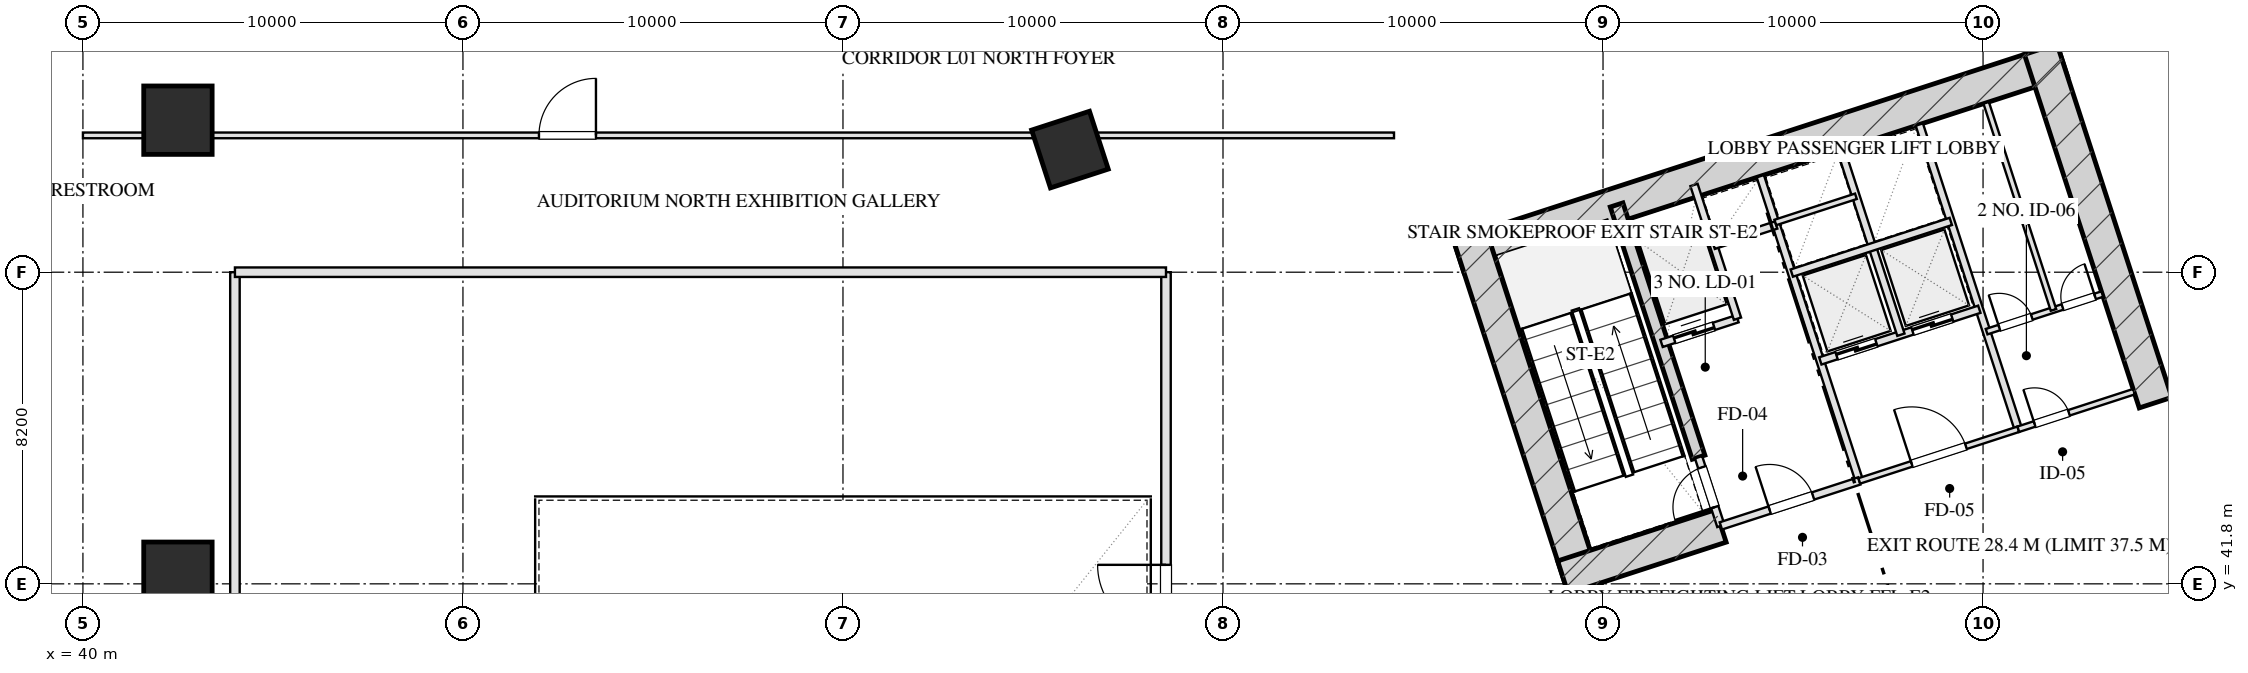
"""IFC4 building model, lengths in metres.
Left out: names, types, materials, properties, quantities, classifications, styles, units other than length and angle.
Written with IfcOpenShell. Run it as: python <this file> out.ifc"""

import sys

from ifc_helpers import new_model, si_unit, direction, frame, frame_2d, origin, origin_2d, place, context, subcontext, project, spatial, rectangle, hollow_rectangle, extrude, element, fill, save


model = new_model("IFC4")
c1 = context("Model", 3, precision=1e-05, world=origin(), true_north=direction((0.0, 1.0)))
c2 = subcontext(c1, "Body", "Model", "MODEL_VIEW")
j1 = project(units=[si_unit("LENGTHUNIT", "METRE"), si_unit("PLANEANGLEUNIT", "RADIAN")], contexts=[c1])
p1 = place(None, origin())
s1 = spatial("IfcSite", under=j1, at=p1, CompositionType="ELEMENT")
p2 = place(p1, origin())
s2 = spatial("IfcBuilding", under=s1, at=p2, CompositionType="ELEMENT")
p3 = place(p2, frame((0.0, 0.0, 6.0)))
s3 = spatial("IfcBuildingStorey", under=s2, at=p3, CompositionType="ELEMENT", Elevation=6.0)
p4 = place(p3, frame((76.201, 50.419, 0.0), z_axis=(0.0, 0.0, 1.0), x_axis=(0.951056412142, 0.309017314926, 0.0)))
e1 = element("IfcWall", 1, at=p4, inside=s3, PredefinedType="SHEAR", context=c2, shape_type="SweptSolid", body=[
    extrude(rectangle(XDim=16.7, YDim=0.9, at=frame_2d((8.35, 0.0))), origin(), (0.0, 0.0, 1.0), 5.5),
])
for number, where, z_axis, x_axis in (
    (2, (79.512, 41.685, 0.0), (0.0, 0.0, 1.0), (-0.309, 0.951, 0.0)),
    (3, (94.539, 46.568, 0.0), (0.0, 0.0, 1.0), (-0.309, 0.951, 0.0)),
):
    element("IfcWall", number, at=place(p3, frame(where, z_axis=z_axis, x_axis=x_axis)), inside=s3, PredefinedType="SHEAR", context=c2, shape_type="SweptSolid", body=[
        extrude(rectangle(XDim=9.78, YDim=0.9, at=frame_2d((4.89, 0.0))), origin(), (0.0, 0.0, 1.0), 5.5),
    ])
p5 = place(p3, frame((82.514, 45.131, 0.0), z_axis=(0.0, 0.0, 1.0), x_axis=(-0.308988790936, 0.951065679686, 0.0)))
e4 = element("IfcWall", 4, at=p5, inside=s3, PredefinedType="SHEAR", context=c2, shape_type="SweptSolid", body=[
    extrude(rectangle(XDim=6.98, YDim=0.35, at=frame_2d((3.49, 0.0))), origin(), (0.0, 0.0, 1.0), 5.5),
])
p6 = place(p3, frame((78.945, 41.974, 0.0), z_axis=(0.0, 0.0, 1.0), x_axis=(0.951058289404, 0.309011537255, 0.0)))
e5 = element("IfcWall", 5, at=p6, inside=s3, PredefinedType="SHEAR", context=c2, shape_type="SweptSolid", body=[
    extrude(rectangle(XDim=4.37, YDim=0.9, at=frame_2d((2.185, 0.0))), origin(), (0.0, 0.0, 1.0), 5.5),
])
for number, where, z_axis, x_axis in (
    (6, (42.5, 42.0, 0.0), (0.0, 0.0, 1.0), (1.0, 0.0, 0.0)),
    (7, (42.5, 54.0, 0.0), (0.0, 0.0, 1.0), (1.0, 0.0, 0.0)),
):
    element("IfcColumn", number, at=place(p3, frame(where, z_axis=z_axis, x_axis=x_axis)), inside=s3, PredefinedType="COLUMN", context=c2, shape_type="SweptSolid", body=[
        extrude(hollow_rectangle(XDim=1.8, YDim=1.8, WallThickness=0.06, at=origin_2d()), origin(), (0.0, 0.0, 1.0), 5.501),
    ])
p7 = place(p3, frame((65.973, 53.226, 0.0), z_axis=(0.0, 0.0, 1.0), x_axis=(0.951056516295, 0.309016994375, 0.0)))
e8 = element("IfcColumn", 8, at=p7, inside=s3, PredefinedType="COLUMN", context=c2, shape_type="SweptSolid", body=[
    extrude(hollow_rectangle(XDim=1.6, YDim=1.6, WallThickness=0.055, at=origin_2d()), origin(), (0.0, 0.0, 1.0), 5.501),
])
p8 = place(p3, frame((83.101, 43.324, 0.0), z_axis=(0.0, 0.0, 1.0), x_axis=(-0.309048298632, 0.951046344356, 0.0)))
e9 = element("IfcWall", 9, at=p8, inside=s3, PredefinedType="PARTITIONING", context=c2, shape_type="SweptSolid", body=[
    extrude(rectangle(XDim=1.9, YDim=0.2, at=frame_2d((0.95, 0.0))), origin(), (0.0, 0.0, 1.0), 5.185),
])
p9 = place(p8, frame((0.52, 0.0, 0.0)))
e10 = element("IfcOpeningElement", 10, at=p9, cuts=e9, PredefinedType="OPENING", context=c2, shape_type="SweptSolid", body=[
    extrude(rectangle(XDim=1.1, YDim=2.05, at=frame_2d((0.55, 1.025))), frame((0.0, 0.11, 0.0), z_axis=(0.0, -1.0, 0.0), x_axis=(1.0, 0.0, 0.0)), (0.0, 0.0, 1.0), 0.22),
])
p10 = place(p3, frame((86.743, 44.508, 0.0), z_axis=(0.0, 0.0, 1.0), x_axis=(-0.309016001439, 0.951056838919, 0.0)))
e11 = element("IfcWall", 11, at=p10, inside=s3, PredefinedType="PARTITIONING", context=c2, shape_type="SweptSolid", body=[
    extrude(rectangle(XDim=8.43, YDim=0.2, at=frame_2d((4.215, 0.0))), origin(), (0.0, 0.0, 1.0), 5.185),
])
p11 = place(p3, frame((83.101, 43.324, 0.0), z_axis=(0.0, 0.0, 1.0), x_axis=(0.951052804469, 0.309028417967, 0.0)))
e12 = element("IfcWall", 12, at=p11, inside=s3, PredefinedType="PARTITIONING", context=c2, shape_type="SweptSolid", body=[
    extrude(rectangle(XDim=3.83, YDim=0.2, at=frame_2d((1.915, 0.0))), origin(), (0.0, 0.0, 1.0), 5.185),
])
p12 = place(p11, frame((1.35, 0.0, 0.0)))
e13 = element("IfcOpeningElement", 13, at=p12, cuts=e12, PredefinedType="OPENING", context=c2, shape_type="SweptSolid", body=[
    extrude(rectangle(XDim=1.2, YDim=2.05, at=frame_2d((0.6, 1.025))), frame((0.0, 0.11, 0.0), z_axis=(0.0, -1.0, 0.0), x_axis=(1.0, 0.0, 0.0)), (0.0, 0.0, 1.0), 0.22),
])
p13 = place(p3, frame((81.54, 48.127, 0.0), z_axis=(0.0, 0.0, 1.0), x_axis=(0.951062257173, 0.308999325213, 0.0)))
e14 = element("IfcWall", 14, at=p13, inside=s3, PredefinedType="PARTITIONING", context=c2, shape_type="SweptSolid", body=[
    extrude(rectangle(XDim=2.1, YDim=0.2, at=frame_2d((1.05, 0.0))), origin(), (0.0, 0.0, 1.0), 5.185),
])
p14 = place(p13, frame((0.35, 0.0, 0.0)))
e15 = element("IfcOpeningElement", 15, at=p14, cuts=e14, PredefinedType="OPENING", context=c2, shape_type="SweptSolid", body=[
    extrude(rectangle(XDim=1.1, YDim=2.05, at=frame_2d((0.55, 1.025))), frame((0.0, 0.11, 0.0), z_axis=(0.0, -1.0, 0.0), x_axis=(1.0, 0.0, 0.0)), (0.0, 0.0, 1.0), 0.22),
])
p15 = place(p3, frame((83.538, 48.776, 0.0), z_axis=(0.0, 0.0, 1.0), x_axis=(-0.3089935693, 0.951064127245, 0.0)))
e16 = element("IfcWall", 16, at=p15, inside=s3, PredefinedType="PARTITIONING", context=c2, shape_type="SweptSolid", body=[
    extrude(rectangle(XDim=3.7, YDim=0.2, at=frame_2d((1.85, 0.0))), origin(), (0.0, 0.0, 1.0), 5.185),
])
p16 = place(p3, frame((82.91, 50.707, 0.0), z_axis=(0.0, 0.0, 1.0), x_axis=(0.951041328149, 0.309063734775, 0.0)))
e17 = element("IfcWall", 17, at=p16, inside=s3, PredefinedType="PARTITIONING", context=c2, shape_type="SweptSolid", body=[
    extrude(rectangle(XDim=1.73, YDim=0.2, at=frame_2d((0.865, 0.0))), origin(), (0.0, 0.0, 1.0), 5.185),
])
p17 = place(p3, frame((90.928, 45.868, 0.0), z_axis=(0.0, 0.0, 1.0), x_axis=(-0.309042196757, 0.951048327176, 0.0)))
e18 = element("IfcWall", 18, at=p17, inside=s3, PredefinedType="PARTITIONING", context=c2, shape_type="SweptSolid", body=[
    extrude(rectangle(XDim=8.43, YDim=0.2, at=frame_2d((4.215, 0.0))), origin(), (0.0, 0.0, 1.0), 5.185),
])
p18 = place(p3, frame((86.743, 44.508, 0.0), z_axis=(0.0, 0.0, 1.0), x_axis=(0.951063829732, 0.308994485023, 0.0)))
e19 = element("IfcWall", 19, at=p18, inside=s3, PredefinedType="PARTITIONING", context=c2, shape_type="SweptSolid", body=[
    extrude(rectangle(XDim=4.4, YDim=0.15, at=frame_2d((2.2, 0.0))), origin(), (0.0, 0.0, 1.0), 5.185),
])
p19 = place(p18, frame((1.45, 0.0, 0.0)))
e20 = element("IfcOpeningElement", 20, at=p19, cuts=e19, PredefinedType="OPENING", context=c2, shape_type="SweptSolid", body=[
    extrude(rectangle(XDim=1.5, YDim=2.05, at=frame_2d((0.75, 1.025))), frame((0.0, 0.085, 0.0), z_axis=(0.0, -1.0, 0.0), x_axis=(1.0, 0.0, 0.0)), (0.0, 0.0, 1.0), 0.17),
])
p20 = place(p3, frame((85.718, 47.666, 0.0), z_axis=(0.0, 0.0, 1.0), x_axis=(0.951058531764, 0.30901079133, 0.0)))
e21 = element("IfcWall", 21, at=p20, inside=s3, PredefinedType="PARTITIONING", context=c2, shape_type="SweptSolid", body=[
    extrude(rectangle(XDim=4.4, YDim=0.2, at=frame_2d((2.2, 0.0))), origin(), (0.0, 0.0, 1.0), 5.185),
])
p21 = place(p20, frame((0.45, 0.0, 0.0)))
e22 = element("IfcOpeningElement", 22, at=p21, cuts=e21, PredefinedType="OPENING", context=c2, shape_type="SweptSolid", body=[
    extrude(rectangle(XDim=1.1, YDim=2.05, at=frame_2d((0.55, 1.025))), frame((0.0, 0.11, 0.0), z_axis=(0.0, -1.0, 0.0), x_axis=(1.0, 0.0, 0.0)), (0.0, 0.0, 1.0), 0.22),
])
p22 = place(p20, frame((2.55, 0.0, 0.0)))
e23 = element("IfcOpeningElement", 23, at=p22, cuts=e21, PredefinedType="OPENING", context=c2, shape_type="SweptSolid", body=[
    extrude(rectangle(XDim=1.1, YDim=2.05, at=frame_2d((0.55, 1.025))), frame((0.0, 0.11, 0.0), z_axis=(0.0, -1.0, 0.0), x_axis=(1.0, 0.0, 0.0)), (0.0, 0.0, 1.0), 0.22),
])
p23 = place(p3, frame((87.838, 48.354, 0.0), z_axis=(0.0, 0.0, 1.0), x_axis=(-0.3090093719, 0.951058992953, 0.0)))
e24 = element("IfcWall", 24, at=p23, inside=s3, PredefinedType="PARTITIONING", context=c2, shape_type="SweptSolid", body=[
    extrude(rectangle(XDim=5.11, YDim=0.2, at=frame_2d((2.555, 0.0))), origin(), (0.0, 0.0, 1.0), 5.185),
])
p24 = place(p3, frame((84.967, 49.977, 0.0), z_axis=(0.0, 0.0, 1.0), x_axis=(0.951063829732, 0.308994485023, 0.0)))
e25 = element("IfcWall", 25, at=p24, inside=s3, PredefinedType="PARTITIONING", context=c2, shape_type="SweptSolid", body=[
    extrude(rectangle(XDim=4.4, YDim=0.2, at=frame_2d((2.2, 0.0))), origin(), (0.0, 0.0, 1.0), 5.185),
])
p25 = place(p3, frame((84.534, 51.308, 0.0), z_axis=(0.0, 0.0, 1.0), x_axis=(0.951075093106, 0.308959814982, 0.0)))
e26 = element("IfcWall", 26, at=p25, inside=s3, PredefinedType="PARTITIONING", context=c2, shape_type="SweptSolid", body=[
    extrude(rectangle(XDim=2.23, YDim=0.15, at=frame_2d((1.115, 0.0))), origin(), (0.0, 0.0, 1.0), 5.185),
])
p26 = place(p3, frame((90.928, 45.868, 0.0), z_axis=(0.0, 0.0, 1.0), x_axis=(0.951059297078, 0.309008435874, 0.0)))
e27 = element("IfcWall", 27, at=p26, inside=s3, PredefinedType="PARTITIONING", context=c2, shape_type="SweptSolid", body=[
    extrude(rectangle(XDim=3.2, YDim=0.15, at=frame_2d((1.6, 0.0))), origin(), (0.0, 0.0, 1.0), 5.185),
])
p27 = place(p26, frame((0.45, 0.0, 0.0)))
e28 = element("IfcOpeningElement", 28, at=p27, cuts=e27, PredefinedType="OPENING", context=c2, shape_type="SweptSolid", body=[
    extrude(rectangle(XDim=0.95, YDim=2.05, at=frame_2d((0.475, 1.025))), frame((0.0, 0.085, 0.0), z_axis=(0.0, -1.0, 0.0), x_axis=(1.0, 0.0, 0.0)), (0.0, 0.0, 1.0), 0.17),
])
p28 = place(p3, frame((90.094, 48.436, 0.0), z_axis=(0.0, 0.0, 1.0), x_axis=(0.951066581729, 0.308986014439, 0.0)))
e29 = element("IfcWall", 29, at=p28, inside=s3, PredefinedType="PARTITIONING", context=c2, shape_type="SweptSolid", body=[
    extrude(rectangle(XDim=3.2, YDim=0.15, at=frame_2d((1.6, 0.0))), origin(), (0.0, 0.0, 1.0), 5.185),
])
p29 = place(p28, frame((0.35, 0.0, 0.0)))
e30 = element("IfcOpeningElement", 30, at=p29, cuts=e29, PredefinedType="OPENING", context=c2, shape_type="SweptSolid", body=[
    extrude(rectangle(XDim=0.9, YDim=2.05, at=frame_2d((0.45, 1.025))), frame((0.0, 0.085, 0.0), z_axis=(0.0, -1.0, 0.0), x_axis=(1.0, 0.0, 0.0)), (0.0, 0.0, 1.0), 0.17),
])
p30 = place(p28, frame((2.1, 0.0, 0.0)))
e31 = element("IfcOpeningElement", 31, at=p30, cuts=e29, PredefinedType="OPENING", context=c2, shape_type="SweptSolid", body=[
    extrude(rectangle(XDim=0.9, YDim=2.05, at=frame_2d((0.45, 1.025))), frame((0.0, 0.085, 0.0), z_axis=(0.0, -1.0, 0.0), x_axis=(1.0, 0.0, 0.0)), (0.0, 0.0, 1.0), 0.17),
])
p31 = place(p3, frame((91.853, 49.007, 0.0), z_axis=(0.0, 0.0, 1.0), x_axis=(-0.309022487551, 0.951054731437, 0.0)))
e32 = element("IfcWall", 32, at=p31, inside=s3, PredefinedType="PARTITIONING", context=c2, shape_type="SweptSolid", body=[
    extrude(rectangle(XDim=5.73, YDim=0.15, at=frame_2d((2.865, 0.0))), origin(), (0.0, 0.0, 1.0), 5.185),
])
p32 = place(p3, frame((44.0, 18.0, 0.0), z_axis=(0.0, 0.0, 1.0), x_axis=(0.0, 1.0, 0.0)))
e33 = element("IfcWall", 33, at=p32, inside=s3, PredefinedType="PARTITIONING", context=c2, shape_type="SweptSolid", body=[
    extrude(rectangle(XDim=32.0, YDim=0.25, at=frame_2d((16.0, 0.0))), origin(), (0.0, 0.0, 1.0), 5.185),
])
p33 = place(p32, frame((9.4, 0.0, 0.0)))
e34 = element("IfcOpeningElement", 34, at=p33, cuts=e33, PredefinedType="OPENING", context=c2, shape_type="SweptSolid", body=[
    extrude(rectangle(XDim=1.8, YDim=2.05, at=frame_2d((0.9, 1.025))), frame((0.0, 0.135, 0.0), z_axis=(0.0, -1.0, 0.0), x_axis=(1.0, 0.0, 0.0)), (0.0, 0.0, 1.0), 0.27),
])
p34 = place(p32, frame((20.6, 0.0, 0.0)))
e35 = element("IfcOpeningElement", 35, at=p34, cuts=e33, PredefinedType="OPENING", context=c2, shape_type="SweptSolid", body=[
    extrude(rectangle(XDim=1.8, YDim=2.05, at=frame_2d((0.9, 1.025))), frame((0.0, 0.135, 0.0), z_axis=(0.0, -1.0, 0.0), x_axis=(1.0, 0.0, 0.0)), (0.0, 0.0, 1.0), 0.27),
])
p35 = place(p3, frame((68.5, 18.0, 0.0), z_axis=(0.0, 0.0, 1.0), x_axis=(0.0, 1.0, 0.0)))
e36 = element("IfcWall", 36, at=p35, inside=s3, PredefinedType="PARTITIONING", context=c2, shape_type="SweptSolid", body=[
    extrude(rectangle(XDim=32.0, YDim=0.25, at=frame_2d((16.0, 0.0))), origin(), (0.0, 0.0, 1.0), 5.185),
])
p36 = place(p35, frame((7.5, 0.0, 0.0)))
e37 = element("IfcOpeningElement", 37, at=p36, cuts=e36, PredefinedType="OPENING", context=c2, shape_type="SweptSolid", body=[
    extrude(rectangle(XDim=1.8, YDim=2.05, at=frame_2d((0.9, 1.025))), frame((0.0, 0.135, 0.0), z_axis=(0.0, -1.0, 0.0), x_axis=(1.0, 0.0, 0.0)), (0.0, 0.0, 1.0), 0.27),
])
p37 = place(p35, frame((22.5, 0.0, 0.0)))
e38 = element("IfcOpeningElement", 38, at=p37, cuts=e36, PredefinedType="OPENING", context=c2, shape_type="SweptSolid", body=[
    extrude(rectangle(XDim=1.8, YDim=2.05, at=frame_2d((0.9, 1.025))), frame((0.0, 0.135, 0.0), z_axis=(0.0, -1.0, 0.0), x_axis=(1.0, 0.0, 0.0)), (0.0, 0.0, 1.0), 0.27),
])
p38 = place(p3, frame((44.0, 50.0, 0.0), z_axis=(0.0, 0.0, 1.0), x_axis=(1.0, 0.0, 0.0)))
e39 = element("IfcWall", 39, at=p38, inside=s3, PredefinedType="PARTITIONING", context=c2, shape_type="SweptSolid", body=[
    extrude(rectangle(XDim=24.5, YDim=0.25, at=frame_2d((12.25, 0.0))), origin(), (0.0, 0.0, 1.0), 5.185),
])
p39 = place(p3, frame((40.0, 53.6, 0.0), z_axis=(0.0, 0.0, 1.0), x_axis=(1.0, 0.0, 0.0)))
e40 = element("IfcWall", 40, at=p39, inside=s3, PredefinedType="PARTITIONING", context=c2, shape_type="SweptSolid", body=[
    extrude(rectangle(XDim=34.5, YDim=0.15, at=frame_2d((17.25, 0.0))), origin(), (0.0, 0.0, 1.0), 5.185),
])
p40 = place(p39, frame((12.0, 0.0, 0.0)))
e41 = element("IfcOpeningElement", 41, at=p40, cuts=e40, PredefinedType="OPENING", context=c2, shape_type="SweptSolid", body=[
    extrude(rectangle(XDim=1.5, YDim=2.05, at=frame_2d((0.75, 1.025))), frame((0.0, 0.085, 0.0), z_axis=(0.0, -1.0, 0.0), x_axis=(1.0, 0.0, 0.0)), (0.0, 0.0, 1.0), 0.17),
])
p41 = place(p9, origin())
e42 = element("IfcDoor", 42, at=p41, inside=s3, OperationType="SINGLE_SWING_LEFT", PredefinedType="DOOR", context=c2, shape_type="SweptSolid", body=[
    extrude(rectangle(XDim=1.1, YDim=2.05, at=frame_2d((0.55, 1.025))), frame((0.0, 0.025, 0.0), z_axis=(0.0, -1.0, 0.0), x_axis=(1.0, 0.0, 0.0)), (0.0, 0.0, 1.0), 0.05),
])
fill(e10, e42)
p42 = place(p12, origin())
e43 = element("IfcDoor", 43, at=p42, inside=s3, OperationType="SINGLE_SWING_LEFT", PredefinedType="DOOR", context=c2, shape_type="SweptSolid", body=[
    extrude(rectangle(XDim=1.2, YDim=2.05, at=frame_2d((0.6, 1.025))), frame((0.0, 0.025, 0.0), z_axis=(0.0, -1.0, 0.0), x_axis=(1.0, 0.0, 0.0)), (0.0, 0.0, 1.0), 0.05),
])
fill(e13, e43)
p43 = place(p14, origin())
e44 = element("IfcDoor", 44, at=p43, inside=s3, OperationType="DOUBLE_DOOR_SLIDING", PredefinedType="DOOR", context=c2, shape_type="SweptSolid", body=[
    extrude(rectangle(XDim=1.1, YDim=2.05, at=frame_2d((0.55, 1.025))), frame((0.0, 0.025, 0.0), z_axis=(0.0, -1.0, 0.0), x_axis=(1.0, 0.0, 0.0)), (0.0, 0.0, 1.0), 0.05),
])
fill(e15, e44)
p44 = place(p19, origin())
e45 = element("IfcDoor", 45, at=p44, inside=s3, OperationType="SINGLE_SWING_LEFT", PredefinedType="DOOR", context=c2, shape_type="SweptSolid", body=[
    extrude(rectangle(XDim=1.5, YDim=2.05, at=frame_2d((0.75, 1.025))), frame((0.0, 0.025, 0.0), z_axis=(0.0, -1.0, 0.0), x_axis=(1.0, 0.0, 0.0)), (0.0, 0.0, 1.0), 0.05),
])
fill(e20, e45)
p45 = place(p21, origin())
e46 = element("IfcDoor", 46, at=p45, inside=s3, OperationType="DOUBLE_DOOR_SLIDING", PredefinedType="DOOR", context=c2, shape_type="SweptSolid", body=[
    extrude(rectangle(XDim=1.1, YDim=2.05, at=frame_2d((0.55, 1.025))), frame((0.0, 0.025, 0.0), z_axis=(0.0, -1.0, 0.0), x_axis=(1.0, 0.0, 0.0)), (0.0, 0.0, 1.0), 0.05),
])
fill(e22, e46)
p46 = place(p22, origin())
e47 = element("IfcDoor", 47, at=p46, inside=s3, OperationType="DOUBLE_DOOR_SLIDING", PredefinedType="DOOR", context=c2, shape_type="SweptSolid", body=[
    extrude(rectangle(XDim=1.1, YDim=2.05, at=frame_2d((0.55, 1.025))), frame((0.0, 0.025, 0.0), z_axis=(0.0, -1.0, 0.0), x_axis=(1.0, 0.0, 0.0)), (0.0, 0.0, 1.0), 0.05),
])
fill(e23, e47)
p47 = place(p27, origin())
e48 = element("IfcDoor", 48, at=p47, inside=s3, OperationType="SINGLE_SWING_LEFT", PredefinedType="DOOR", context=c2, shape_type="SweptSolid", body=[
    extrude(rectangle(XDim=0.95, YDim=2.05, at=frame_2d((0.475, 1.025))), frame((0.0, 0.025, 0.0), z_axis=(0.0, -1.0, 0.0), x_axis=(1.0, 0.0, 0.0)), (0.0, 0.0, 1.0), 0.05),
])
fill(e28, e48)
p48 = place(p29, origin())
e49 = element("IfcDoor", 49, at=p48, inside=s3, OperationType="SINGLE_SWING_LEFT", PredefinedType="DOOR", context=c2, shape_type="SweptSolid", body=[
    extrude(rectangle(XDim=0.9, YDim=2.05, at=frame_2d((0.45, 1.025))), frame((0.0, 0.025, 0.0), z_axis=(0.0, -1.0, 0.0), x_axis=(1.0, 0.0, 0.0)), (0.0, 0.0, 1.0), 0.05),
])
fill(e30, e49)
p49 = place(p30, origin())
e50 = element("IfcDoor", 50, at=p49, inside=s3, OperationType="SINGLE_SWING_RIGHT", PredefinedType="DOOR", context=c2, shape_type="SweptSolid", body=[
    extrude(rectangle(XDim=0.9, YDim=2.05, at=frame_2d((0.45, 1.025))), frame((0.0, 0.025, 0.0), z_axis=(0.0, -1.0, 0.0), x_axis=(1.0, 0.0, 0.0)), (0.0, 0.0, 1.0), 0.05),
])
fill(e31, e50)
p50 = place(p37, origin())
e51 = element("IfcDoor", 51, at=p50, inside=s3, OperationType="SINGLE_SWING_RIGHT", PredefinedType="DOOR", context=c2, shape_type="SweptSolid", body=[
    extrude(rectangle(XDim=1.8, YDim=2.05, at=frame_2d((0.9, 1.025))), frame((0.0, 0.025, 0.0), z_axis=(0.0, -1.0, 0.0), x_axis=(1.0, 0.0, 0.0)), (0.0, 0.0, 1.0), 0.05),
])
fill(e38, e51)
p51 = place(p40, origin())
e52 = element("IfcDoor", 52, at=p51, inside=s3, OperationType="SINGLE_SWING_RIGHT", PredefinedType="DOOR", context=c2, shape_type="SweptSolid", body=[
    extrude(rectangle(XDim=1.5, YDim=2.05, at=frame_2d((0.75, 1.025))), frame((0.0, 0.025, 0.0), z_axis=(0.0, -1.0, 0.0), x_axis=(1.0, 0.0, 0.0)), (0.0, 0.0, 1.0), 0.05),
])
fill(e41, e52)
save(model, sys.argv[1])
